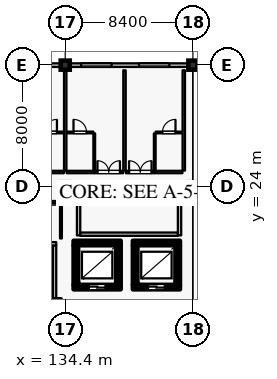
"""IFC4 building model, lengths in metres.
Left out: names, types, materials, properties, quantities, classifications, styles, units other than length and angle.
Written with IfcOpenShell. Run it as: python <this file> out.ifc"""

import sys

from ifc_helpers import new_model, si_unit, direction, frame, frame_2d, origin, origin_2d, place, context, subcontext, project, spatial, rectangle, extrude, element, fill, save


model = new_model("IFC4")
c1 = context("Model", 3, precision=1e-05, world=origin(), true_north=direction((0.0, 1.0)))
c2 = subcontext(c1, "Body", "Model", "MODEL_VIEW")
j1 = project(units=[si_unit("LENGTHUNIT", "METRE"), si_unit("PLANEANGLEUNIT", "RADIAN")], contexts=[c1])
p1 = place(None, origin())
s1 = spatial("IfcSite", under=j1, at=p1, CompositionType="ELEMENT")
p2 = place(p1, origin())
s2 = spatial("IfcBuilding", under=s1, at=p2, CompositionType="ELEMENT")
p3 = place(p2, frame((0.0, 0.0, 47.4)))
s3 = spatial("IfcBuildingStorey", under=s2, at=p3, CompositionType="ELEMENT", Elevation=47.4)
for number, where, z_axis, x_axis in (
    (1, (134.4, 32.0, 0.0), (0.0, 0.0, 1.0), (1.0, 0.0, 0.0)),
    (2, (142.8, 32.0, 0.0), (0.0, 0.0, 1.0), (1.0, 0.0, 0.0)),
    (3, (134.4, 24.0, 0.0), (0.0, 0.0, 1.0), (1.0, 0.0, 0.0)),
    (4, (142.8, 24.0, 0.0), (0.0, 0.0, 1.0), (1.0, 0.0, 0.0)),
):
    element("IfcColumn", number, at=place(p3, frame(where, z_axis=z_axis, x_axis=x_axis)), inside=s3, PredefinedType="COLUMN", context=c2, shape_type="SweptSolid", body=[
        extrude(rectangle(XDim=0.6, YDim=0.6, at=origin_2d()), origin(), (0.0, 0.0, 1.0), 4.2),
    ])
p4 = place(p3, frame((126.3, 32.0, 0.0), z_axis=(0.0, 0.0, 1.0), x_axis=(1.0, 0.0, 0.0)))
e5 = element("IfcWall", 5, at=p4, inside=s3, PredefinedType="SOLIDWALL", context=c2, shape_type="SweptSolid", body=[
    extrude(rectangle(XDim=7.8, YDim=0.24, at=frame_2d((3.9, 0.0))), origin(), (0.0, 0.0, 1.0), 3.49),
])
p5 = place(p4, frame((1.25, 0.0, 0.8)))
e6 = element("IfcOpeningElement", 6, at=p5, cuts=e5, PredefinedType="OPENING", context=c2, shape_type="SweptSolid", body=[
    extrude(rectangle(XDim=2.0, YDim=1.75, at=frame_2d((1.0, 0.875))), frame((0.0, 0.13, 0.0), z_axis=(0.0, -1.0, 0.0), x_axis=(1.0, 0.0, 0.0)), (0.0, 0.0, 1.0), 0.26),
])
p6 = place(p4, frame((5.05, 0.0, 0.8)))
e7 = element("IfcOpeningElement", 7, at=p6, cuts=e5, PredefinedType="OPENING", context=c2, shape_type="SweptSolid", body=[
    extrude(rectangle(XDim=2.0, YDim=1.75, at=frame_2d((1.0, 0.875))), frame((0.0, 0.13, 0.0), z_axis=(0.0, -1.0, 0.0), x_axis=(1.0, 0.0, 0.0)), (0.0, 0.0, 1.0), 0.26),
])
p7 = place(p3, frame((134.7, 32.0, 0.0), z_axis=(0.0, 0.0, 1.0), x_axis=(1.0, 0.0, 0.0)))
e8 = element("IfcWall", 8, at=p7, inside=s3, PredefinedType="SOLIDWALL", context=c2, shape_type="SweptSolid", body=[
    extrude(rectangle(XDim=7.8, YDim=0.24, at=frame_2d((3.9, 0.0))), origin(), (0.0, 0.0, 1.0), 3.49),
])
p8 = place(p7, frame((0.75, 0.0, 0.8)))
e9 = element("IfcOpeningElement", 9, at=p8, cuts=e8, PredefinedType="OPENING", context=c2, shape_type="SweptSolid", body=[
    extrude(rectangle(XDim=2.0, YDim=1.75, at=frame_2d((1.0, 0.875))), frame((0.0, 0.13, 0.0), z_axis=(0.0, -1.0, 0.0), x_axis=(1.0, 0.0, 0.0)), (0.0, 0.0, 1.0), 0.26),
])
p9 = place(p7, frame((4.55, 0.0, 0.8)))
e10 = element("IfcOpeningElement", 10, at=p9, cuts=e8, PredefinedType="OPENING", context=c2, shape_type="SweptSolid", body=[
    extrude(rectangle(XDim=2.0, YDim=1.75, at=frame_2d((1.0, 0.875))), frame((0.0, 0.13, 0.0), z_axis=(0.0, -1.0, 0.0), x_axis=(1.0, 0.0, 0.0)), (0.0, 0.0, 1.0), 0.26),
])
p10 = place(p3, frame((134.95, 17.4, 0.0), z_axis=(0.0, 0.0, 1.0), x_axis=(1.0, 0.0, 0.0)))
e11 = element("IfcWall", 11, at=p10, inside=s3, PredefinedType="SHEAR", context=c2, shape_type="SweptSolid", body=[
    extrude(rectangle(XDim=3.1, YDim=0.3, at=frame_2d((1.55, 0.0))), origin(), (0.0, 0.0, 1.0), 3.935),
])
p11 = place(p10, frame((1.0, 0.0, 0.0)))
e12 = element("IfcOpeningElement", 12, at=p11, cuts=e11, PredefinedType="OPENING", context=c2, shape_type="SweptSolid", body=[
    extrude(rectangle(XDim=1.1, YDim=2.2, at=frame_2d((0.55, 1.1))), frame((0.0, 0.16, 0.0), z_axis=(0.0, -1.0, 0.0), x_axis=(1.0, 0.0, 0.0)), (0.0, 0.0, 1.0), 0.32),
])
p12 = place(p3, frame((137.9, 17.555, 0.0), z_axis=(0.0, 0.0, 1.0), x_axis=(0.0, 1.0, 0.0)))
e13 = element("IfcWall", 13, at=p12, inside=s3, PredefinedType="SHEAR", context=c2, shape_type="SweptSolid", body=[
    extrude(rectangle(XDim=2.59, YDim=0.3, at=frame_2d((1.295, 0.0))), origin(), (0.0, 0.0, 1.0), 3.935),
])
p13 = place(p3, frame((138.05, 20.3, 0.0), z_axis=(0.0, 0.0, 1.0), x_axis=(-1.0, 0.0, 0.0)))
e14 = element("IfcWall", 14, at=p13, inside=s3, PredefinedType="SHEAR", context=c2, shape_type="SweptSolid", body=[
    extrude(rectangle(XDim=3.1, YDim=0.3, at=frame_2d((1.55, 0.0))), origin(), (0.0, 0.0, 1.0), 3.935),
])
p14 = place(p3, frame((135.1, 20.145, 0.0), z_axis=(0.0, 0.0, 1.0), x_axis=(0.0, -1.0, 0.0)))
e15 = element("IfcWall", 15, at=p14, inside=s3, PredefinedType="SHEAR", context=c2, shape_type="SweptSolid", body=[
    extrude(rectangle(XDim=2.59, YDim=0.3, at=frame_2d((1.295, 0.0))), origin(), (0.0, 0.0, 1.0), 3.935),
])
p15 = place(p3, frame((138.85, 17.4, 0.0), z_axis=(0.0, 0.0, 1.0), x_axis=(1.0, 0.0, 0.0)))
e16 = element("IfcWall", 16, at=p15, inside=s3, PredefinedType="SHEAR", context=c2, shape_type="SweptSolid", body=[
    extrude(rectangle(XDim=3.1, YDim=0.3, at=frame_2d((1.55, 0.0))), origin(), (0.0, 0.0, 1.0), 3.935),
])
p16 = place(p15, frame((1.0, 0.0, 0.0)))
e17 = element("IfcOpeningElement", 17, at=p16, cuts=e16, PredefinedType="OPENING", context=c2, shape_type="SweptSolid", body=[
    extrude(rectangle(XDim=1.1, YDim=2.2, at=frame_2d((0.55, 1.1))), frame((0.0, 0.16, 0.0), z_axis=(0.0, -1.0, 0.0), x_axis=(1.0, 0.0, 0.0)), (0.0, 0.0, 1.0), 0.32),
])
p17 = place(p3, frame((141.8, 17.555, 0.0), z_axis=(0.0, 0.0, 1.0), x_axis=(0.0, 1.0, 0.0)))
e18 = element("IfcWall", 18, at=p17, inside=s3, PredefinedType="SHEAR", context=c2, shape_type="SweptSolid", body=[
    extrude(rectangle(XDim=2.59, YDim=0.3, at=frame_2d((1.295, 0.0))), origin(), (0.0, 0.0, 1.0), 3.935),
])
p18 = place(p3, frame((141.95, 20.3, 0.0), z_axis=(0.0, 0.0, 1.0), x_axis=(-1.0, 0.0, 0.0)))
e19 = element("IfcWall", 19, at=p18, inside=s3, PredefinedType="SHEAR", context=c2, shape_type="SweptSolid", body=[
    extrude(rectangle(XDim=3.1, YDim=0.3, at=frame_2d((1.55, 0.0))), origin(), (0.0, 0.0, 1.0), 3.935),
])
p19 = place(p3, frame((139.0, 20.145, 0.0), z_axis=(0.0, 0.0, 1.0), x_axis=(0.0, -1.0, 0.0)))
e20 = element("IfcWall", 20, at=p19, inside=s3, PredefinedType="SHEAR", context=c2, shape_type="SweptSolid", body=[
    extrude(rectangle(XDim=2.59, YDim=0.3, at=frame_2d((1.295, 0.0))), origin(), (0.0, 0.0, 1.0), 3.935),
])
p20 = place(p3, frame((134.11, 16.45, 0.0), z_axis=(0.0, 0.0, 1.0), x_axis=(-1.0, 0.0, 0.0)))
e21 = element("IfcWall", 21, at=p20, inside=s3, PredefinedType="SHEAR", context=c2, shape_type="SweptSolid", body=[
    extrude(rectangle(XDim=4.06, YDim=0.3, at=frame_2d((2.03, 0.0))), origin(), (0.0, 0.0, 1.0), 3.935),
])
p21 = place(p20, frame((1.685, 0.0, 0.0)))
e22 = element("IfcOpeningElement", 22, at=p21, cuts=e21, PredefinedType="OPENING", context=c2, shape_type="SweptSolid", body=[
    extrude(rectangle(XDim=1.25, YDim=2.25, at=frame_2d((0.625, 1.125))), frame((0.0, 0.16, 0.0), z_axis=(0.0, -1.0, 0.0), x_axis=(1.0, 0.0, 0.0)), (0.0, 0.0, 1.0), 0.32),
])
p22 = place(p3, frame((133.7, 16.605, 0.0), z_axis=(0.0, 0.0, 1.0), x_axis=(0.0, 1.0, 0.0)))
e23 = element("IfcWall", 23, at=p22, inside=s3, PredefinedType="PARTITIONING", context=c2, shape_type="SweptSolid", body=[
    extrude(rectangle(XDim=3.53, YDim=0.22, at=frame_2d((1.765, 0.0))), origin(), (0.0, 0.0, 1.0), 3.935),
])
p23 = place(p3, frame((129.79, 20.25, 0.0), z_axis=(0.0, 0.0, 1.0), x_axis=(1.0, 0.0, 0.0)))
e24 = element("IfcWall", 24, at=p23, inside=s3, PredefinedType="PARTITIONING", context=c2, shape_type="SweptSolid", body=[
    extrude(rectangle(XDim=4.02, YDim=0.22, at=frame_2d((2.01, 0.0))), origin(), (0.0, 0.0, 1.0), 3.935),
])
p24 = place(p23, frame((1.39, 0.0, 0.0)))
e25 = element("IfcOpeningElement", 25, at=p24, cuts=e24, PredefinedType="OPENING", context=c2, shape_type="SweptSolid", body=[
    extrude(rectangle(XDim=1.24, YDim=2.2, at=frame_2d((0.62, 1.1))), frame((0.0, 0.12, 0.0), z_axis=(0.0, -1.0, 0.0), x_axis=(1.0, 0.0, 0.0)), (0.0, 0.0, 1.0), 0.24),
])
p25 = place(p3, frame((132.5, 24.97, 0.0), z_axis=(0.0, 0.0, 1.0), x_axis=(1.0, 0.0, 0.0)))
e26 = element("IfcWall", 26, at=p25, inside=s3, PredefinedType="PARTITIONING", context=c2, shape_type="SweptSolid", body=[
    extrude(rectangle(XDim=1.81, YDim=0.16, at=frame_2d((0.905, 0.0))), origin(), (0.0, 0.0, 1.0), 3.935),
])
p26 = place(p3, frame((132.55, 27.57, 0.0), z_axis=(0.0, 0.0, 1.0), x_axis=(1.0, 0.0, 0.0)))
e27 = element("IfcWall", 27, at=p26, inside=s3, PredefinedType="PARTITIONING", context=c2, shape_type="SweptSolid", body=[
    extrude(rectangle(XDim=1.75, YDim=0.115, at=frame_2d((0.875, 0.0))), origin(), (0.0, 0.0, 1.0), 3.935),
])
p27 = place(p26, frame((0.445, 0.0, 0.0)))
e28 = element("IfcOpeningElement", 28, at=p27, cuts=e27, PredefinedType="OPENING", context=c2, shape_type="SweptSolid", body=[
    extrude(rectangle(XDim=0.86, YDim=2.12, at=frame_2d((0.43, 1.06))), frame((0.0, 0.067, 0.0), z_axis=(0.0, -1.0, 0.0), x_axis=(1.0, 0.0, 0.0)), (0.0, 0.0, 1.0), 0.135),
])
p28 = place(p3, frame((134.49, 24.97, 0.0), z_axis=(0.0, 0.0, 1.0), x_axis=(1.0, 0.0, 0.0)))
e29 = element("IfcWall", 29, at=p28, inside=s3, PredefinedType="PARTITIONING", context=c2, shape_type="SweptSolid", body=[
    extrude(rectangle(XDim=1.81, YDim=0.16, at=frame_2d((0.905, 0.0))), origin(), (0.0, 0.0, 1.0), 3.935),
])
p29 = place(p3, frame((136.31, 24.97, 0.0), z_axis=(0.0, 0.0, 1.0), x_axis=(1.0, 0.0, 0.0)))
e30 = element("IfcWall", 30, at=p29, inside=s3, PredefinedType="PARTITIONING", context=c2, shape_type="SweptSolid", body=[
    extrude(rectangle(XDim=1.9, YDim=0.16, at=frame_2d((0.95, 0.0))), origin(), (0.0, 0.0, 1.0), 3.935),
])
p30 = place(p29, frame((0.21, 0.0, 0.0)))
e31 = element("IfcOpeningElement", 31, at=p30, cuts=e30, PredefinedType="OPENING", context=c2, shape_type="SweptSolid", body=[
    extrude(rectangle(XDim=1.48, YDim=2.35, at=frame_2d((0.74, 1.175))), frame((0.0, 0.09, 0.0), z_axis=(0.0, -1.0, 0.0), x_axis=(1.0, 0.0, 0.0)), (0.0, 0.0, 1.0), 0.18),
])
p31 = place(p3, frame((136.31, 25.06, 0.0), z_axis=(0.0, 0.0, 1.0), x_axis=(0.0, 1.0, 0.0)))
e32 = element("IfcWall", 32, at=p31, inside=s3, PredefinedType="PARTITIONING", context=c2, shape_type="SweptSolid", body=[
    extrude(rectangle(XDim=2.45, YDim=0.115, at=frame_2d((1.225, 0.0))), origin(), (0.0, 0.0, 1.0), 3.935),
])
p32 = place(p3, frame((134.5, 27.57, 0.0), z_axis=(0.0, 0.0, 1.0), x_axis=(1.0, 0.0, 0.0)))
e33 = element("IfcWall", 33, at=p32, inside=s3, PredefinedType="PARTITIONING", context=c2, shape_type="SweptSolid", body=[
    extrude(rectangle(XDim=1.75, YDim=0.115, at=frame_2d((0.875, 0.0))), origin(), (0.0, 0.0, 1.0), 3.935),
])
p33 = place(p32, frame((0.445, 0.0, 0.0)))
e34 = element("IfcOpeningElement", 34, at=p33, cuts=e33, PredefinedType="OPENING", context=c2, shape_type="SweptSolid", body=[
    extrude(rectangle(XDim=0.86, YDim=2.12, at=frame_2d((0.43, 1.06))), frame((0.0, 0.067, 0.0), z_axis=(0.0, -1.0, 0.0), x_axis=(1.0, 0.0, 0.0)), (0.0, 0.0, 1.0), 0.135),
])
p34 = place(p3, frame((134.4, 25.06, 0.0), z_axis=(0.0, 0.0, 1.0), x_axis=(0.0, 1.0, 0.0)))
e35 = element("IfcWall", 35, at=p34, inside=s3, PredefinedType="PARTITIONING", context=c2, shape_type="SweptSolid", body=[
    extrude(rectangle(XDim=6.6, YDim=0.16, at=frame_2d((3.3, 0.0))), origin(), (0.0, 0.0, 1.0), 3.29),
])
p35 = place(p3, frame((138.39, 24.97, 0.0), z_axis=(0.0, 0.0, 1.0), x_axis=(1.0, 0.0, 0.0)))
e36 = element("IfcWall", 36, at=p35, inside=s3, PredefinedType="PARTITIONING", context=c2, shape_type="SweptSolid", body=[
    extrude(rectangle(XDim=1.9, YDim=0.16, at=frame_2d((0.95, 0.0))), origin(), (0.0, 0.0, 1.0), 3.935),
])
p36 = place(p35, frame((0.21, 0.0, 0.0)))
e37 = element("IfcOpeningElement", 37, at=p36, cuts=e36, PredefinedType="OPENING", context=c2, shape_type="SweptSolid", body=[
    extrude(rectangle(XDim=1.48, YDim=2.35, at=frame_2d((0.74, 1.175))), frame((0.0, 0.09, 0.0), z_axis=(0.0, -1.0, 0.0), x_axis=(1.0, 0.0, 0.0)), (0.0, 0.0, 1.0), 0.18),
])
p37 = place(p3, frame((140.3, 24.97, 0.0), z_axis=(0.0, 0.0, 1.0), x_axis=(1.0, 0.0, 0.0)))
e38 = element("IfcWall", 38, at=p37, inside=s3, PredefinedType="PARTITIONING", context=c2, shape_type="SweptSolid", body=[
    extrude(rectangle(XDim=1.81, YDim=0.16, at=frame_2d((0.905, 0.0))), origin(), (0.0, 0.0, 1.0), 3.935),
])
p38 = place(p3, frame((140.29, 25.06, 0.0), z_axis=(0.0, 0.0, 1.0), x_axis=(0.0, 1.0, 0.0)))
e39 = element("IfcWall", 39, at=p38, inside=s3, PredefinedType="PARTITIONING", context=c2, shape_type="SweptSolid", body=[
    extrude(rectangle(XDim=2.45, YDim=0.115, at=frame_2d((1.225, 0.0))), origin(), (0.0, 0.0, 1.0), 3.935),
])
p39 = place(p3, frame((140.35, 27.57, 0.0), z_axis=(0.0, 0.0, 1.0), x_axis=(1.0, 0.0, 0.0)))
e40 = element("IfcWall", 40, at=p39, inside=s3, PredefinedType="PARTITIONING", context=c2, shape_type="SweptSolid", body=[
    extrude(rectangle(XDim=1.75, YDim=0.115, at=frame_2d((0.875, 0.0))), origin(), (0.0, 0.0, 1.0), 3.935),
])
p40 = place(p39, frame((0.445, 0.0, 0.0)))
e41 = element("IfcOpeningElement", 41, at=p40, cuts=e40, PredefinedType="OPENING", context=c2, shape_type="SweptSolid", body=[
    extrude(rectangle(XDim=0.86, YDim=2.12, at=frame_2d((0.43, 1.06))), frame((0.0, 0.067, 0.0), z_axis=(0.0, -1.0, 0.0), x_axis=(1.0, 0.0, 0.0)), (0.0, 0.0, 1.0), 0.135),
])
for number, where, z_axis, x_axis in (
    (42, (138.3, 25.06, 0.0), (0.0, 0.0, 1.0), (0.0, 1.0, 0.0)),
    (43, (142.2, 25.06, 0.0), (0.0, 0.0, 1.0), (0.0, 1.0, 0.0)),
):
    element("IfcWall", number, at=place(p3, frame(where, z_axis=z_axis, x_axis=x_axis)), inside=s3, PredefinedType="PARTITIONING", context=c2, shape_type="SweptSolid", body=[
        extrude(rectangle(XDim=6.6, YDim=0.16, at=frame_2d((3.3, 0.0))), origin(), (0.0, 0.0, 1.0), 3.935),
    ])
p41 = place(p3, frame((135.36, 23.2, 0.0), z_axis=(0.0, 0.0, 1.0), x_axis=(1.0, 0.0, 0.0)))
e44 = element("IfcWall", 44, at=p41, inside=s3, PredefinedType="PARTITIONING", context=c2, shape_type="SweptSolid", body=[
    extrude(rectangle(XDim=6.48, YDim=0.22, at=frame_2d((3.24, 0.0))), origin(), (0.0, 0.0, 1.0), 3.935),
])
p42 = place(p41, frame((2.49, 0.0, 0.0)))
e45 = element("IfcOpeningElement", 45, at=p42, cuts=e44, PredefinedType="OPENING", context=c2, shape_type="SweptSolid", body=[
    extrude(rectangle(XDim=1.5, YDim=2.3, at=frame_2d((0.75, 1.15))), frame((0.0, 0.12, 0.0), z_axis=(0.0, -1.0, 0.0), x_axis=(1.0, 0.0, 0.0)), (0.0, 0.0, 1.0), 0.24),
])
p43 = place(p3, frame((131.16, 23.0, 0.0), z_axis=(0.0, 0.0, 1.0), x_axis=(1.0, 0.0, 0.0)))
e46 = element("IfcWall", 46, at=p43, inside=s3, PredefinedType="PARTITIONING", context=c2, shape_type="SweptSolid", body=[
    extrude(rectangle(XDim=2.88, YDim=0.125, at=frame_2d((1.44, 0.0))), origin(), (0.0, 0.0, 1.0), 3.935),
])
p44 = place(p43, frame((0.95, 0.0, 0.0)))
e47 = element("IfcOpeningElement", 47, at=p44, cuts=e46, PredefinedType="OPENING", context=c2, shape_type="SweptSolid", body=[
    extrude(rectangle(XDim=0.98, YDim=2.15, at=frame_2d((0.49, 1.075))), frame((0.0, 0.073, 0.0), z_axis=(0.0, -1.0, 0.0), x_axis=(1.0, 0.0, 0.0)), (0.0, 0.0, 1.0), 0.145),
])
for number, where, z_axis, x_axis in (
    (48, (135.28, 20.8, 0.0), (0.0, 0.0, 1.0), (0.0, 1.0, 0.0)),
    (49, (141.92, 20.8, 0.0), (0.0, 0.0, 1.0), (0.0, 1.0, 0.0)),
):
    element("IfcWall", number, at=place(p3, frame(where, z_axis=z_axis, x_axis=x_axis)), inside=s3, PredefinedType="PARTITIONING", context=c2, shape_type="SweptSolid", body=[
        extrude(rectangle(XDim=2.348, YDim=0.22, at=frame_2d((1.174, 0.0))), origin(), (0.0, 0.0, 1.0), 3.935),
    ])
p45 = place(p3, frame((135.39, 20.88, 0.0), z_axis=(0.0, 0.0, 1.0), x_axis=(1.0, 0.0, 0.0)))
e50 = element("IfcWall", 50, at=p45, inside=s3, PredefinedType="PARTITIONING", context=c2, shape_type="SweptSolid", body=[
    extrude(rectangle(XDim=6.42, YDim=0.22, at=frame_2d((3.21, 0.0))), origin(), (0.0, 0.0, 1.0), 3.935),
])
p46 = place(p3, frame((134.12, 20.6, 0.0), z_axis=(0.0, 0.0, 1.0), x_axis=(0.0, 1.0, 0.0)))
e51 = element("IfcWall", 51, at=p46, inside=s3, PredefinedType="PARTITIONING", context=c2, shape_type="SweptSolid", body=[
    extrude(rectangle(XDim=2.396, YDim=0.125, at=frame_2d((1.198, 0.0))), origin(), (0.0, 0.0, 1.0), 3.935),
])
p47 = place(p8, origin())
e52 = element("IfcWindow", 52, at=p47, inside=s3, PartitioningType="DOUBLE_PANEL_VERTICAL", PredefinedType="WINDOW", context=c2, shape_type="SweptSolid", body=[
    extrude(rectangle(XDim=2.0, YDim=1.75, at=frame_2d((1.0, 0.875))), frame((0.0, 0.03, 0.0), z_axis=(0.0, -1.0, 0.0), x_axis=(1.0, 0.0, 0.0)), (0.0, 0.0, 1.0), 0.06),
])
fill(e9, e52)
p48 = place(p9, origin())
e53 = element("IfcWindow", 53, at=p48, inside=s3, PartitioningType="DOUBLE_PANEL_VERTICAL", PredefinedType="WINDOW", context=c2, shape_type="SweptSolid", body=[
    extrude(rectangle(XDim=2.0, YDim=1.75, at=frame_2d((1.0, 0.875))), frame((0.0, 0.03, 0.0), z_axis=(0.0, -1.0, 0.0), x_axis=(1.0, 0.0, 0.0)), (0.0, 0.0, 1.0), 0.06),
])
fill(e10, e53)
p49 = place(p11, origin())
e54 = element("IfcDoor", 54, at=p49, inside=s3, OperationType="DOUBLE_DOOR_SLIDING", PredefinedType="DOOR", context=c2, shape_type="SweptSolid", body=[
    extrude(rectangle(XDim=1.1, YDim=2.2, at=frame_2d((0.55, 1.1))), frame((0.0, 0.025, 0.0), z_axis=(0.0, -1.0, 0.0), x_axis=(1.0, 0.0, 0.0)), (0.0, 0.0, 1.0), 0.05),
])
fill(e12, e54)
p50 = place(p16, origin())
e55 = element("IfcDoor", 55, at=p50, inside=s3, OperationType="DOUBLE_DOOR_SLIDING", PredefinedType="DOOR", context=c2, shape_type="SweptSolid", body=[
    extrude(rectangle(XDim=1.1, YDim=2.2, at=frame_2d((0.55, 1.1))), frame((0.0, 0.025, 0.0), z_axis=(0.0, -1.0, 0.0), x_axis=(1.0, 0.0, 0.0)), (0.0, 0.0, 1.0), 0.05),
])
fill(e17, e55)
p51 = place(p27, origin())
e56 = element("IfcDoor", 56, at=p51, inside=s3, OperationType="SINGLE_SWING_RIGHT", PredefinedType="DOOR", context=c2, shape_type="SweptSolid", body=[
    extrude(rectangle(XDim=0.86, YDim=2.12, at=frame_2d((0.43, 1.06))), frame((0.0, 0.025, 0.0), z_axis=(0.0, -1.0, 0.0), x_axis=(1.0, 0.0, 0.0)), (0.0, 0.0, 1.0), 0.05),
])
fill(e28, e56)
p52 = place(p30, origin())
e57 = element("IfcDoor", 57, at=p52, inside=s3, OperationType="DOUBLE_DOOR_SINGLE_SWING", PredefinedType="DOOR", context=c2, shape_type="SweptSolid", body=[
    extrude(rectangle(XDim=1.48, YDim=2.35, at=frame_2d((0.74, 1.175))), frame((0.0, 0.025, 0.0), z_axis=(0.0, -1.0, 0.0), x_axis=(1.0, 0.0, 0.0)), (0.0, 0.0, 1.0), 0.05),
])
fill(e31, e57)
p53 = place(p33, origin())
e58 = element("IfcDoor", 58, at=p53, inside=s3, OperationType="SINGLE_SWING_LEFT", PredefinedType="DOOR", context=c2, shape_type="SweptSolid", body=[
    extrude(rectangle(XDim=0.86, YDim=2.12, at=frame_2d((0.43, 1.06))), frame((0.0, 0.025, 0.0), z_axis=(0.0, -1.0, 0.0), x_axis=(1.0, 0.0, 0.0)), (0.0, 0.0, 1.0), 0.05),
])
fill(e34, e58)
p54 = place(p36, origin())
e59 = element("IfcDoor", 59, at=p54, inside=s3, OperationType="DOUBLE_DOOR_SINGLE_SWING", PredefinedType="DOOR", context=c2, shape_type="SweptSolid", body=[
    extrude(rectangle(XDim=1.48, YDim=2.35, at=frame_2d((0.74, 1.175))), frame((0.0, 0.025, 0.0), z_axis=(0.0, -1.0, 0.0), x_axis=(1.0, 0.0, 0.0)), (0.0, 0.0, 1.0), 0.05),
])
fill(e37, e59)
p55 = place(p40, origin())
e60 = element("IfcDoor", 60, at=p55, inside=s3, OperationType="SINGLE_SWING_RIGHT", PredefinedType="DOOR", context=c2, shape_type="SweptSolid", body=[
    extrude(rectangle(XDim=0.86, YDim=2.12, at=frame_2d((0.43, 1.06))), frame((0.0, 0.025, 0.0), z_axis=(0.0, -1.0, 0.0), x_axis=(1.0, 0.0, 0.0)), (0.0, 0.0, 1.0), 0.05),
])
fill(e41, e60)
p56 = place(p42, origin())
e61 = element("IfcDoor", 61, at=p56, inside=s3, OperationType="DOUBLE_DOOR_SINGLE_SWING", PredefinedType="DOOR", context=c2, shape_type="SweptSolid", body=[
    extrude(rectangle(XDim=1.5, YDim=2.3, at=frame_2d((0.75, 1.15))), frame((0.0, 0.025, 0.0), z_axis=(0.0, -1.0, 0.0), x_axis=(1.0, 0.0, 0.0)), (0.0, 0.0, 1.0), 0.05),
])
fill(e45, e61)
save(model, sys.argv[1])
